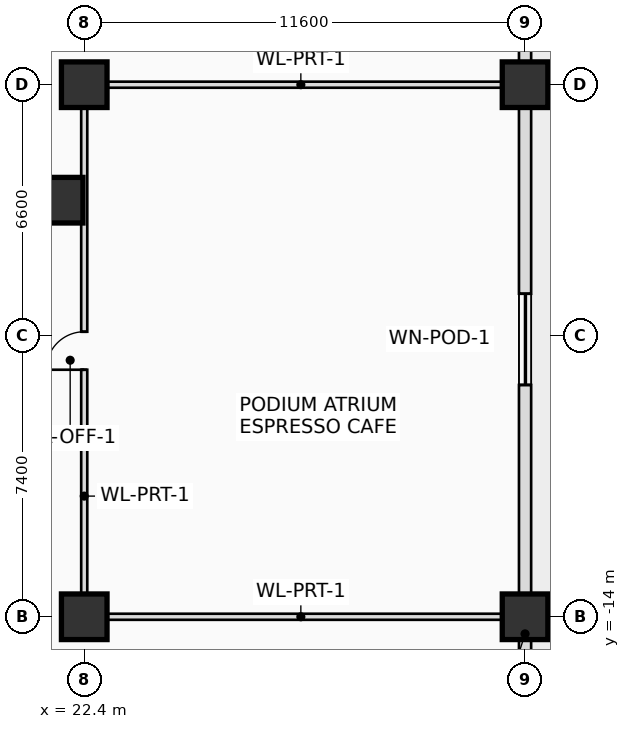
"""IFC4 building model, lengths in metres.
Left out: names, types, materials, properties, quantities, classifications, styles, units other than length and angle.
Written with IfcOpenShell. Run it as: python <this file> out.ifc"""

import sys

from ifc_helpers import new_model, si_unit, direction, frame, frame_2d, origin, origin_2d, place, context, subcontext, project, spatial, rectangle, extrude, source, transform, mapped, element, fill, save


model = new_model("IFC4")
c1 = context("Model", 3, precision=1e-05, world=origin(), true_north=direction((0.0, 1.0)))
c2 = subcontext(c1, "Body", "Model", "MODEL_VIEW")
j1 = project(units=[si_unit("LENGTHUNIT", "METRE"), si_unit("PLANEANGLEUNIT", "RADIAN")], contexts=[c1])
p1 = place(None, origin())
s1 = spatial("IfcSite", under=j1, at=p1, CompositionType="ELEMENT")
p2 = place(p1, origin())
s2 = spatial("IfcBuilding", under=s1, at=p2, CompositionType="ELEMENT")
p3 = place(p2, origin())
s3 = spatial("IfcBuildingStorey", under=s2, at=p3, CompositionType="ELEMENT", Elevation=0.0)
m1 = source(origin(), c2, "Body", "SweptSolid", [
    extrude(rectangle(XDim=1.2, YDim=1.2, at=origin_2d()), origin(), (0.0, 0.0, 1.0), 4.5),
])
for number, where, z_axis, x_axis in (
    (1, (22.4, -14.0, 0.0), (0.0, 0.0, 1.0), (1.0, 0.0, 0.0)),
    (2, (34.0, -14.0, 0.0), (0.0, 0.0, 1.0), (1.0, 0.0, 0.0)),
    (3, (22.4, 0.0, 0.0), (0.0, 0.0, 1.0), (1.0, 0.0, 0.0)),
    (4, (34.0, 0.0, 0.0), (0.0, 0.0, 1.0), (1.0, 0.0, 0.0)),
    (5, (21.766, -3.039, 0.0), (0.0, 0.0, 1.0), (1.0, 0.0, 0.0)),
):
    element("IfcColumn", number, at=place(p3, frame(where, z_axis=z_axis, x_axis=x_axis)), inside=s3, PredefinedType="COLUMN", context=c2, shape_type="MappedRepresentation", body=[
        mapped(m1, transform((0.0, 0.0, 0.0), scale=1.0)),
    ])
p4 = place(p3, frame((34.0, 29.5, 0.0), z_axis=(0.0, 0.0, 1.0), x_axis=(0.0, -1.0, 0.0)))
e6 = element("IfcWall", 6, at=p4, inside=s3, PredefinedType="SOLIDWALL", context=c2, shape_type="SweptSolid", body=[
    extrude(rectangle(XDim=57.0, YDim=0.32, at=frame_2d((28.5, 0.0))), origin(), (0.0, 0.0, 1.0), 3.25),
])
p5 = place(p4, frame((7.65, 0.0, 0.0)))
e7 = element("IfcOpeningElement", 7, at=p5, cuts=e6, PredefinedType="OPENING", context=c2, shape_type="SweptSolid", body=[
    extrude(rectangle(XDim=2.45, YDim=2.55, at=frame_2d((1.225, 1.275))), frame((0.0, 0.17, 0.0), z_axis=(0.0, -1.0, 0.0), x_axis=(1.0, 0.0, 0.0)), (0.0, 0.0, 1.0), 0.34),
])
p6 = place(p4, frame((25.0, 0.0, 0.0)))
e8 = element("IfcOpeningElement", 8, at=p6, cuts=e6, PredefinedType="OPENING", context=c2, shape_type="SweptSolid", body=[
    extrude(rectangle(XDim=2.5, YDim=2.6, at=frame_2d((1.25, 1.3))), frame((0.0, 0.17, 0.0), z_axis=(0.0, -1.0, 0.0), x_axis=(1.0, 0.0, 0.0)), (0.0, 0.0, 1.0), 0.34),
])
p7 = place(p4, frame((18.9, 0.0, 0.0)))
e9 = element("IfcOpeningElement", 9, at=p7, cuts=e6, PredefinedType="OPENING", context=c2, shape_type="SweptSolid", body=[
    extrude(rectangle(XDim=1.2, YDim=2.2, at=frame_2d((0.6, 1.1))), frame((0.0, 0.17, 0.0), z_axis=(0.0, -1.0, 0.0), x_axis=(1.0, 0.0, 0.0)), (0.0, 0.0, 1.0), 0.34),
])
p8 = place(p4, frame((50.5, 0.0, 0.0)))
e10 = element("IfcOpeningElement", 10, at=p8, cuts=e6, PredefinedType="OPENING", context=c2, shape_type="SweptSolid", body=[
    extrude(rectangle(XDim=4.2, YDim=2.8, at=frame_2d((2.1, 1.4))), frame((0.0, 0.17, 0.0), z_axis=(0.0, -1.0, 0.0), x_axis=(1.0, 0.0, 0.0)), (0.0, 0.0, 1.0), 0.34),
])
p9 = place(p4, frame((35.0, 0.0, 0.4)))
e11 = element("IfcOpeningElement", 11, at=p9, cuts=e6, PredefinedType="OPENING", context=c2, shape_type="SweptSolid", body=[
    extrude(rectangle(XDim=2.4, YDim=2.4, at=frame_2d((1.2, 1.2))), frame((0.0, 0.17, 0.0), z_axis=(0.0, -1.0, 0.0), x_axis=(1.0, 0.0, 0.0)), (0.0, 0.0, 1.0), 0.34),
])
p10 = place(p3, frame((22.4, -14.0, 0.0), z_axis=(0.0, 0.0, 1.0), x_axis=(0.0, 1.0, 0.0)))
e12 = element("IfcWall", 12, at=p10, inside=s3, PredefinedType="PARTITIONING", context=c2, shape_type="SweptSolid", body=[
    extrude(rectangle(XDim=14.0, YDim=0.16, at=frame_2d((7.0, 0.0))), origin(), (0.0, 0.0, 1.0), 3.375),
])
p11 = place(p10, frame((6.5, 0.0, 0.0)))
e13 = element("IfcOpeningElement", 13, at=p11, cuts=e12, PredefinedType="OPENING", context=c2, shape_type="SweptSolid", body=[
    extrude(rectangle(XDim=1.0, YDim=2.25, at=frame_2d((0.5, 1.125))), frame((0.0, 0.09, 0.0), z_axis=(0.0, -1.0, 0.0), x_axis=(1.0, 0.0, 0.0)), (0.0, 0.0, 1.0), 0.18),
])
for number, where, z_axis, x_axis in (
    (14, (22.4, 0.0, 0.0), (0.0, 0.0, 1.0), (1.0, 0.0, 0.0)),
    (15, (22.4, -14.0, 0.0), (0.0, 0.0, 1.0), (1.0, 0.0, 0.0)),
):
    element("IfcWall", number, at=place(p3, frame(where, z_axis=z_axis, x_axis=x_axis)), inside=s3, PredefinedType="PARTITIONING", context=c2, shape_type="SweptSolid", body=[
        extrude(rectangle(XDim=11.4, YDim=0.16, at=frame_2d((5.7, 0.0))), origin(), (0.0, 0.0, 1.0), 3.375),
    ])
p12 = place(p9, origin())
e16 = element("IfcWindow", 16, at=p12, inside=s3, PartitioningType="SINGLE_PANEL", PredefinedType="WINDOW", context=c2, shape_type="SweptSolid", body=[
    extrude(rectangle(XDim=2.4, YDim=2.4, at=frame_2d((1.2, 1.2))), frame((0.0, 0.03, 0.0), z_axis=(0.0, -1.0, 0.0), x_axis=(1.0, 0.0, 0.0)), (0.0, 0.0, 1.0), 0.06),
])
fill(e11, e16)
p13 = place(p11, origin())
e17 = element("IfcDoor", 17, at=p13, inside=s3, OperationType="SINGLE_SWING_LEFT", PredefinedType="DOOR", context=c2, shape_type="SweptSolid", body=[
    extrude(rectangle(XDim=1.0, YDim=2.25, at=frame_2d((0.5, 1.125))), frame((0.0, 0.025, 0.0), z_axis=(0.0, -1.0, 0.0), x_axis=(1.0, 0.0, 0.0)), (0.0, 0.0, 1.0), 0.05),
])
fill(e13, e17)
save(model, sys.argv[1])
